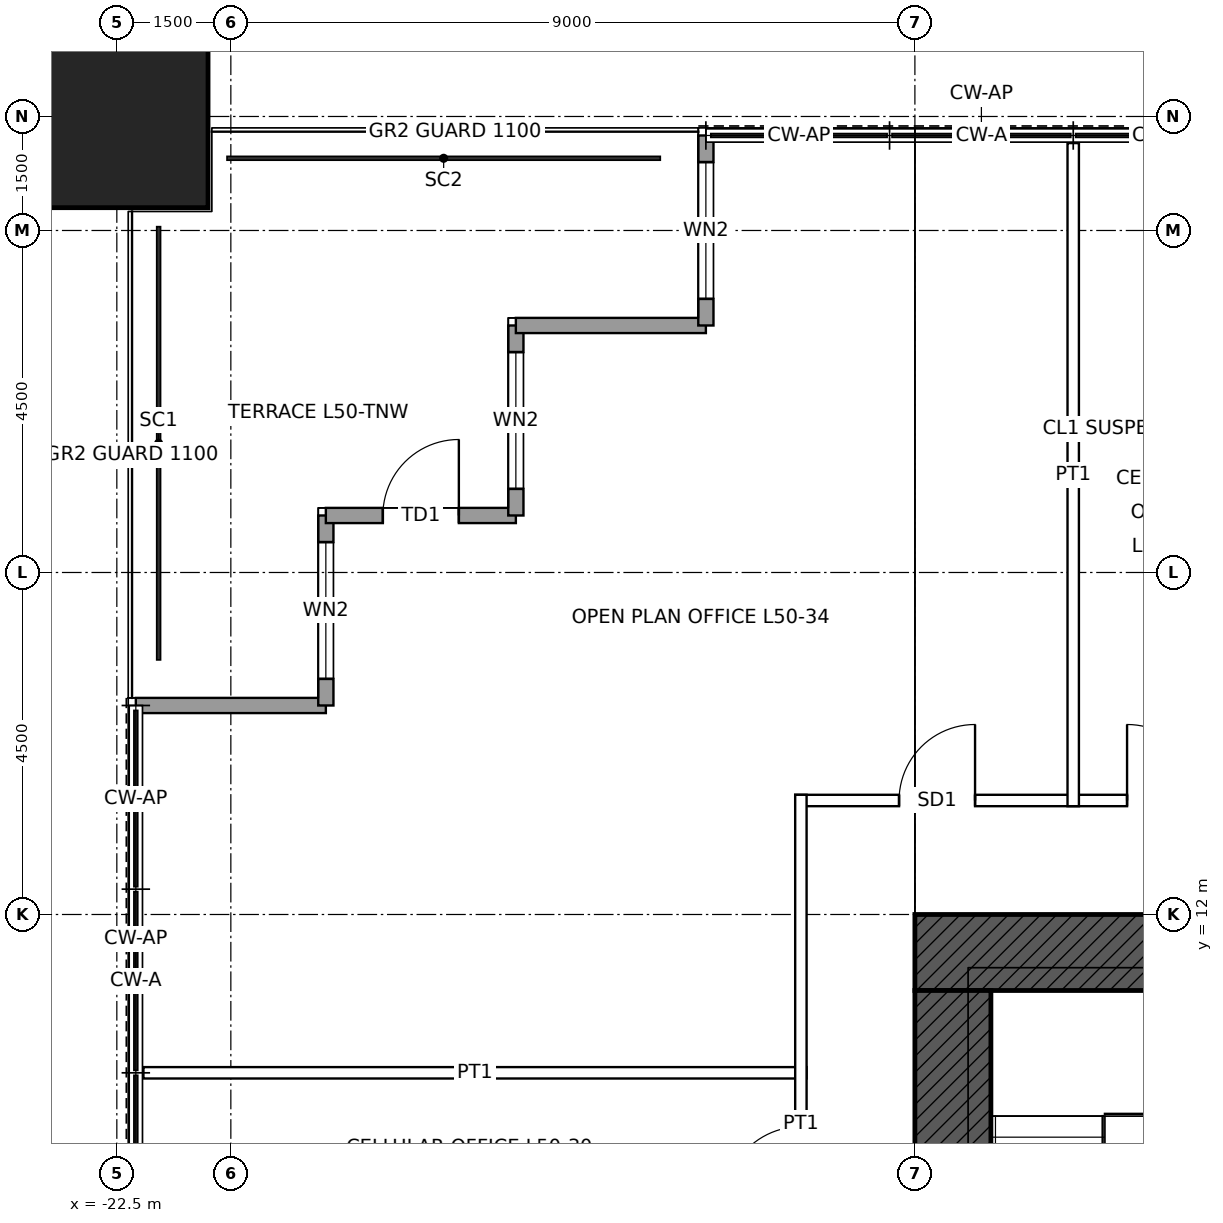
"""IFC4 building model, lengths in metres.
Left out: names, types, materials, properties, quantities, classifications, styles, units other than length and angle.
Written with IfcOpenShell. Run it as: python <this file> out.ifc"""

import sys

from ifc_helpers import new_model, si_unit, direction, frame, frame_2d, origin, origin_2d, place, context, subcontext, project, spatial, rectangle, hollow_rectangle, extrude, element, fill, save


model = new_model("IFC4")
c1 = context("Model", 3, precision=1e-05, world=origin(), true_north=direction((0.0, 1.0)))
c2 = subcontext(c1, "Body", "Model", "MODEL_VIEW")
j1 = project(units=[si_unit("LENGTHUNIT", "METRE"), si_unit("PLANEANGLEUNIT", "RADIAN")], contexts=[c1])
p1 = place(None, origin())
s1 = spatial("IfcSite", under=j1, at=p1, CompositionType="ELEMENT")
p2 = place(p1, origin())
s2 = spatial("IfcBuilding", under=s1, at=p2, CompositionType="ELEMENT")
p3 = place(p2, frame((0.0, 0.0, 233.9)))
s3 = spatial("IfcBuildingStorey", under=s2, at=p3, CompositionType="ELEMENT", Elevation=233.9)
p4 = place(p3, frame((-22.5, 22.5, 0.0), z_axis=(0.0, 0.0, 1.0), x_axis=(1.0, 0.0, 0.0)))
e1 = element("IfcColumn", 1, at=p4, inside=s3, PredefinedType="COLUMN", context=c2, shape_type="SweptSolid", body=[
    extrude(hollow_rectangle(XDim=2.4, YDim=2.4, WallThickness=0.12, at=origin_2d()), origin(), (0.0, 0.0, 1.0), 4.0),
])
p5 = place(p3, frame((-12.0, 11.5, 0.0), z_axis=(0.0, 0.0, 1.0), x_axis=(1.0, 0.0, 0.0)))
e2 = element("IfcWall", 2, at=p5, inside=s3, PredefinedType="SHEAR", context=c2, shape_type="SweptSolid", body=[
    extrude(rectangle(XDim=24.0, YDim=1.0, at=frame_2d((12.0, 0.0))), origin(), (0.0, 0.0, 1.0), 4.0),
])
p6 = place(p5, frame((6.25, 0.0, 0.0)))
e3 = element("IfcOpeningElement", 3, at=p6, cuts=e2, PredefinedType="OPENING", context=c2, shape_type="SweptSolid", body=[
    extrude(rectangle(XDim=1.0, YDim=2.4, at=frame_2d((0.5, 1.2))), frame((0.0, 0.51, 0.0), z_axis=(0.0, -1.0, 0.0), x_axis=(1.0, 0.0, 0.0)), (0.0, 0.0, 1.0), 1.02),
])
p7 = place(p5, frame((16.75, 0.0, 0.0)))
e4 = element("IfcOpeningElement", 4, at=p7, cuts=e2, PredefinedType="OPENING", context=c2, shape_type="SweptSolid", body=[
    extrude(rectangle(XDim=1.0, YDim=2.4, at=frame_2d((0.5, 1.2))), frame((0.0, 0.51, 0.0), z_axis=(0.0, -1.0, 0.0), x_axis=(1.0, 0.0, 0.0)), (0.0, 0.0, 1.0), 1.02),
])
p8 = place(p3, frame((-11.5, -11.0, 0.0), z_axis=(0.0, 0.0, 1.0), x_axis=(0.0, 1.0, 0.0)))
e5 = element("IfcWall", 5, at=p8, inside=s3, PredefinedType="SHEAR", context=c2, shape_type="SweptSolid", body=[
    extrude(rectangle(XDim=22.0, YDim=1.0, at=frame_2d((11.0, 0.0))), origin(), (0.0, 0.0, 1.0), 4.0),
])
p9 = place(p8, frame((10.5, 0.0, 0.0)))
e6 = element("IfcOpeningElement", 6, at=p9, cuts=e5, PredefinedType="OPENING", context=c2, shape_type="SweptSolid", body=[
    extrude(rectangle(XDim=1.0, YDim=2.4, at=frame_2d((0.5, 1.2))), frame((0.0, 0.51, 0.0), z_axis=(0.0, -1.0, 0.0), x_axis=(1.0, 0.0, 0.0)), (0.0, 0.0, 1.0), 1.02),
])
p10 = place(p3, frame((-22.25, 14.75, 0.0), z_axis=(0.0, 0.0, 1.0), x_axis=(1.0, 0.0, 0.0)))
e7 = element("IfcWall", 7, at=p10, inside=s3, PredefinedType="SOLIDWALL", context=c2, shape_type="SweptSolid", body=[
    extrude(rectangle(XDim=2.5, YDim=0.2, at=frame_2d((1.25, 0.0))), origin(), (0.0, 0.0, 1.0), 3.85),
])
p11 = place(p3, frame((-19.75, 14.75, 0.0), z_axis=(0.0, 0.0, 1.0), x_axis=(0.0, 1.0, 0.0)))
e8 = element("IfcWall", 8, at=p11, inside=s3, PredefinedType="SOLIDWALL", context=c2, shape_type="SweptSolid", body=[
    extrude(rectangle(XDim=2.5, YDim=0.2, at=frame_2d((1.25, 0.0))), origin(), (0.0, 0.0, 1.0), 3.85),
])
p12 = place(p11, frame((0.35, 0.0, 0.3)))
e9 = element("IfcOpeningElement", 9, at=p12, cuts=e8, PredefinedType="OPENING", context=c2, shape_type="SweptSolid", body=[
    extrude(rectangle(XDim=1.8, YDim=2.4, at=frame_2d((0.9, 1.2))), frame((0.0, 0.11, 0.0), z_axis=(0.0, -1.0, 0.0), x_axis=(1.0, 0.0, 0.0)), (0.0, 0.0, 1.0), 0.22),
])
p13 = place(p3, frame((-19.75, 17.25, 0.0), z_axis=(0.0, 0.0, 1.0), x_axis=(1.0, 0.0, 0.0)))
e10 = element("IfcWall", 10, at=p13, inside=s3, PredefinedType="SOLIDWALL", context=c2, shape_type="SweptSolid", body=[
    extrude(rectangle(XDim=2.5, YDim=0.2, at=frame_2d((1.25, 0.0))), origin(), (0.0, 0.0, 1.0), 3.85),
])
p14 = place(p13, frame((0.75, 0.0, 0.0)))
e11 = element("IfcOpeningElement", 11, at=p14, cuts=e10, PredefinedType="OPENING", context=c2, shape_type="SweptSolid", body=[
    extrude(rectangle(XDim=1.0, YDim=2.4, at=frame_2d((0.5, 1.2))), frame((0.0, 0.11, 0.0), z_axis=(0.0, -1.0, 0.0), x_axis=(1.0, 0.0, 0.0)), (0.0, 0.0, 1.0), 0.22),
])
p15 = place(p3, frame((-17.25, 17.25, 0.0), z_axis=(0.0, 0.0, 1.0), x_axis=(0.0, 1.0, 0.0)))
e12 = element("IfcWall", 12, at=p15, inside=s3, PredefinedType="SOLIDWALL", context=c2, shape_type="SweptSolid", body=[
    extrude(rectangle(XDim=2.5, YDim=0.2, at=frame_2d((1.25, 0.0))), origin(), (0.0, 0.0, 1.0), 3.85),
])
p16 = place(p15, frame((0.35, 0.0, 0.3)))
e13 = element("IfcOpeningElement", 13, at=p16, cuts=e12, PredefinedType="OPENING", context=c2, shape_type="SweptSolid", body=[
    extrude(rectangle(XDim=1.8, YDim=2.4, at=frame_2d((0.9, 1.2))), frame((0.0, 0.11, 0.0), z_axis=(0.0, -1.0, 0.0), x_axis=(1.0, 0.0, 0.0)), (0.0, 0.0, 1.0), 0.22),
])
p17 = place(p3, frame((-17.25, 19.75, 0.0), z_axis=(0.0, 0.0, 1.0), x_axis=(1.0, 0.0, 0.0)))
e14 = element("IfcWall", 14, at=p17, inside=s3, PredefinedType="SOLIDWALL", context=c2, shape_type="SweptSolid", body=[
    extrude(rectangle(XDim=2.5, YDim=0.2, at=frame_2d((1.25, 0.0))), origin(), (0.0, 0.0, 1.0), 3.85),
])
p18 = place(p3, frame((-14.75, 19.75, 0.0), z_axis=(0.0, 0.0, 1.0), x_axis=(0.0, 1.0, 0.0)))
e15 = element("IfcWall", 15, at=p18, inside=s3, PredefinedType="SOLIDWALL", context=c2, shape_type="SweptSolid", body=[
    extrude(rectangle(XDim=2.5, YDim=0.2, at=frame_2d((1.25, 0.0))), origin(), (0.0, 0.0, 1.0), 3.85),
])
p19 = place(p18, frame((0.35, 0.0, 0.3)))
e16 = element("IfcOpeningElement", 16, at=p19, cuts=e15, PredefinedType="OPENING", context=c2, shape_type="SweptSolid", body=[
    extrude(rectangle(XDim=1.8, YDim=2.4, at=frame_2d((0.9, 1.2))), frame((0.0, 0.11, 0.0), z_axis=(0.0, -1.0, 0.0), x_axis=(1.0, 0.0, 0.0)), (0.0, 0.0, 1.0), 0.22),
])
p20 = place(p3, frame((-22.15, 9.917, 0.0), z_axis=(0.0, 0.0, 1.0), x_axis=(1.0, 0.0, 0.0)))
e17 = element("IfcWall", 17, at=p20, inside=s3, PredefinedType="PARTITIONING", context=c2, shape_type="SweptSolid", body=[
    extrude(rectangle(XDim=8.725, YDim=0.15, at=frame_2d((4.362, 0.0))), origin(), (0.0, 0.0, 1.0), 3.85),
])
p21 = place(p3, frame((-13.575, 13.5, 0.0), z_axis=(0.0, 0.0, 1.0), x_axis=(1.0, 0.0, 0.0)))
e18 = element("IfcWall", 18, at=p21, inside=s3, PredefinedType="PARTITIONING", context=c2, shape_type="SweptSolid", body=[
    extrude(rectangle(XDim=27.15, YDim=0.15, at=frame_2d((13.575, 0.0))), origin(), (0.0, 0.0, 1.0), 3.85),
])
p22 = place(p21, frame((4.366, 0.0, 0.0)))
e19 = element("IfcOpeningElement", 19, at=p22, cuts=e18, PredefinedType="OPENING", context=c2, shape_type="SweptSolid", body=[
    extrude(rectangle(XDim=1.0, YDim=2.1, at=frame_2d((0.5, 1.05))), frame((0.0, 0.085, 0.0), z_axis=(0.0, -1.0, 0.0), x_axis=(1.0, 0.0, 0.0)), (0.0, 0.0, 1.0), 0.17),
])
p23 = place(p21, frame((6.475, 0.0, 0.0)))
e20 = element("IfcOpeningElement", 20, at=p23, cuts=e18, PredefinedType="OPENING", context=c2, shape_type="SweptSolid", body=[
    extrude(rectangle(XDim=1.0, YDim=2.1, at=frame_2d((0.5, 1.05))), frame((0.0, 0.085, 0.0), z_axis=(0.0, -1.0, 0.0), x_axis=(1.0, 0.0, 0.0)), (0.0, 0.0, 1.0), 0.17),
])
p24 = place(p21, frame((9.465, 0.0, 0.0)))
e21 = element("IfcOpeningElement", 21, at=p24, cuts=e18, PredefinedType="OPENING", context=c2, shape_type="SweptSolid", body=[
    extrude(rectangle(XDim=1.0, YDim=2.1, at=frame_2d((0.5, 1.05))), frame((0.0, 0.085, 0.0), z_axis=(0.0, -1.0, 0.0), x_axis=(1.0, 0.0, 0.0)), (0.0, 0.0, 1.0), 0.17),
])
p25 = place(p21, frame((11.825, 0.0, 0.0)))
e22 = element("IfcOpeningElement", 22, at=p25, cuts=e18, PredefinedType="OPENING", context=c2, shape_type="SweptSolid", body=[
    extrude(rectangle(XDim=1.0, YDim=2.1, at=frame_2d((0.5, 1.05))), frame((0.0, 0.085, 0.0), z_axis=(0.0, -1.0, 0.0), x_axis=(1.0, 0.0, 0.0)), (0.0, 0.0, 1.0), 0.17),
])
p26 = place(p21, frame((14.325, 0.0, 0.0)))
e23 = element("IfcOpeningElement", 23, at=p26, cuts=e18, PredefinedType="OPENING", context=c2, shape_type="SweptSolid", body=[
    extrude(rectangle(XDim=1.0, YDim=2.1, at=frame_2d((0.5, 1.05))), frame((0.0, 0.085, 0.0), z_axis=(0.0, -1.0, 0.0), x_axis=(1.0, 0.0, 0.0)), (0.0, 0.0, 1.0), 0.17),
])
p27 = place(p21, frame((16.475, 0.0, 0.0)))
e24 = element("IfcOpeningElement", 24, at=p27, cuts=e18, PredefinedType="OPENING", context=c2, shape_type="SweptSolid", body=[
    extrude(rectangle(XDim=1.0, YDim=2.1, at=frame_2d((0.5, 1.05))), frame((0.0, 0.085, 0.0), z_axis=(0.0, -1.0, 0.0), x_axis=(1.0, 0.0, 0.0)), (0.0, 0.0, 1.0), 0.17),
])
p28 = place(p21, frame((19.675, 0.0, 0.0)))
e25 = element("IfcOpeningElement", 25, at=p28, cuts=e18, PredefinedType="OPENING", context=c2, shape_type="SweptSolid", body=[
    extrude(rectangle(XDim=1.0, YDim=2.1, at=frame_2d((0.5, 1.05))), frame((0.0, 0.085, 0.0), z_axis=(0.0, -1.0, 0.0), x_axis=(1.0, 0.0, 0.0)), (0.0, 0.0, 1.0), 0.17),
])
p29 = place(p21, frame((21.783, 0.0, 0.0)))
e26 = element("IfcOpeningElement", 26, at=p29, cuts=e18, PredefinedType="OPENING", context=c2, shape_type="SweptSolid", body=[
    extrude(rectangle(XDim=1.0, YDim=2.1, at=frame_2d((0.5, 1.05))), frame((0.0, 0.085, 0.0), z_axis=(0.0, -1.0, 0.0), x_axis=(1.0, 0.0, 0.0)), (0.0, 0.0, 1.0), 0.17),
])
p30 = place(p21, frame((24.783, 0.0, 0.0)))
e27 = element("IfcOpeningElement", 27, at=p30, cuts=e18, PredefinedType="OPENING", context=c2, shape_type="SweptSolid", body=[
    extrude(rectangle(XDim=1.0, YDim=2.4, at=frame_2d((0.5, 1.2))), frame((0.0, 0.085, 0.0), z_axis=(0.0, -1.0, 0.0), x_axis=(1.0, 0.0, 0.0)), (0.0, 0.0, 1.0), 0.17),
])
p31 = place(p21, frame((1.366, 0.0, 0.0)))
e28 = element("IfcOpeningElement", 28, at=p31, cuts=e18, PredefinedType="OPENING", context=c2, shape_type="SweptSolid", body=[
    extrude(rectangle(XDim=1.0, YDim=2.4, at=frame_2d((0.5, 1.2))), frame((0.0, 0.085, 0.0), z_axis=(0.0, -1.0, 0.0), x_axis=(1.0, 0.0, 0.0)), (0.0, 0.0, 1.0), 0.17),
])
p32 = place(p3, frame((-13.5, 4.925, 0.0), z_axis=(0.0, 0.0, 1.0), x_axis=(0.0, 1.0, 0.0)))
e29 = element("IfcWall", 29, at=p32, inside=s3, PredefinedType="PARTITIONING", context=c2, shape_type="SweptSolid", body=[
    extrude(rectangle(XDim=8.65, YDim=0.15, at=frame_2d((4.325, 0.0))), origin(), (0.0, 0.0, 1.0), 3.85),
])
p33 = place(p32, frame((0.825, 0.0, 0.0)))
e30 = element("IfcOpeningElement", 30, at=p33, cuts=e29, PredefinedType="OPENING", context=c2, shape_type="SweptSolid", body=[
    extrude(rectangle(XDim=1.0, YDim=2.1, at=frame_2d((0.5, 1.05))), frame((0.0, 0.085, 0.0), z_axis=(0.0, -1.0, 0.0), x_axis=(1.0, 0.0, 0.0)), (0.0, 0.0, 1.0), 0.17),
])
p34 = place(p32, frame((3.283, 0.0, 0.0)))
e31 = element("IfcOpeningElement", 31, at=p34, cuts=e29, PredefinedType="OPENING", context=c2, shape_type="SweptSolid", body=[
    extrude(rectangle(XDim=1.0, YDim=2.1, at=frame_2d((0.5, 1.05))), frame((0.0, 0.085, 0.0), z_axis=(0.0, -1.0, 0.0), x_axis=(1.0, 0.0, 0.0)), (0.0, 0.0, 1.0), 0.17),
])
p35 = place(p3, frame((-9.917, 13.425, 0.0), z_axis=(0.0, 0.0, 1.0), x_axis=(0.0, 1.0, 0.0)))
e32 = element("IfcWall", 32, at=p35, inside=s3, PredefinedType="PARTITIONING", context=c2, shape_type="SweptSolid", body=[
    extrude(rectangle(XDim=8.725, YDim=0.15, at=frame_2d((4.362, 0.0))), origin(), (0.0, 0.0, 1.0), 3.85),
])
p36 = place(p12, origin())
e33 = element("IfcWindow", 33, at=p36, inside=s3, PartitioningType="SINGLE_PANEL", PredefinedType="WINDOW", context=c2, shape_type="SweptSolid", body=[
    extrude(rectangle(XDim=1.8, YDim=2.4, at=frame_2d((0.9, 1.2))), frame((0.0, 0.03, 0.0), z_axis=(0.0, -1.0, 0.0), x_axis=(1.0, 0.0, 0.0)), (0.0, 0.0, 1.0), 0.06),
])
fill(e9, e33)
p37 = place(p14, origin())
e34 = element("IfcDoor", 34, at=p37, inside=s3, OperationType="SINGLE_SWING_RIGHT", PredefinedType="DOOR", context=c2, shape_type="SweptSolid", body=[
    extrude(rectangle(XDim=1.0, YDim=2.4, at=frame_2d((0.5, 1.2))), frame((0.0, 0.025, 0.0), z_axis=(0.0, -1.0, 0.0), x_axis=(1.0, 0.0, 0.0)), (0.0, 0.0, 1.0), 0.05),
])
fill(e11, e34)
p38 = place(p16, origin())
e35 = element("IfcWindow", 35, at=p38, inside=s3, PartitioningType="SINGLE_PANEL", PredefinedType="WINDOW", context=c2, shape_type="SweptSolid", body=[
    extrude(rectangle(XDim=1.8, YDim=2.4, at=frame_2d((0.9, 1.2))), frame((0.0, 0.03, 0.0), z_axis=(0.0, -1.0, 0.0), x_axis=(1.0, 0.0, 0.0)), (0.0, 0.0, 1.0), 0.06),
])
fill(e13, e35)
p39 = place(p19, origin())
e36 = element("IfcWindow", 36, at=p39, inside=s3, PartitioningType="SINGLE_PANEL", PredefinedType="WINDOW", context=c2, shape_type="SweptSolid", body=[
    extrude(rectangle(XDim=1.8, YDim=2.4, at=frame_2d((0.9, 1.2))), frame((0.0, 0.03, 0.0), z_axis=(0.0, -1.0, 0.0), x_axis=(1.0, 0.0, 0.0)), (0.0, 0.0, 1.0), 0.06),
])
fill(e16, e36)
p40 = place(p22, origin())
e37 = element("IfcDoor", 37, at=p40, inside=s3, OperationType="SINGLE_SWING_LEFT", PredefinedType="DOOR", context=c2, shape_type="SweptSolid", body=[
    extrude(rectangle(XDim=1.0, YDim=2.1, at=frame_2d((0.5, 1.05))), frame((0.0, 0.025, 0.0), z_axis=(0.0, -1.0, 0.0), x_axis=(1.0, 0.0, 0.0)), (0.0, 0.0, 1.0), 0.05),
])
fill(e19, e37)
p41 = place(p34, origin())
e38 = element("IfcDoor", 38, at=p41, inside=s3, OperationType="SINGLE_SWING_LEFT", PredefinedType="DOOR", context=c2, shape_type="SweptSolid", body=[
    extrude(rectangle(XDim=1.0, YDim=2.1, at=frame_2d((0.5, 1.05))), frame((0.0, 0.025, 0.0), z_axis=(0.0, -1.0, 0.0), x_axis=(1.0, 0.0, 0.0)), (0.0, 0.0, 1.0), 0.05),
])
fill(e31, e38)
p42 = place(p31, origin())
e39 = element("IfcDoor", 39, at=p42, inside=s3, OperationType="SINGLE_SWING_RIGHT", PredefinedType="DOOR", context=c2, shape_type="SweptSolid", body=[
    extrude(rectangle(XDim=1.0, YDim=2.4, at=frame_2d((0.5, 1.2))), frame((0.0, 0.025, 0.0), z_axis=(0.0, -1.0, 0.0), x_axis=(1.0, 0.0, 0.0)), (0.0, 0.0, 1.0), 0.05),
])
fill(e28, e39)
save(model, sys.argv[1])
